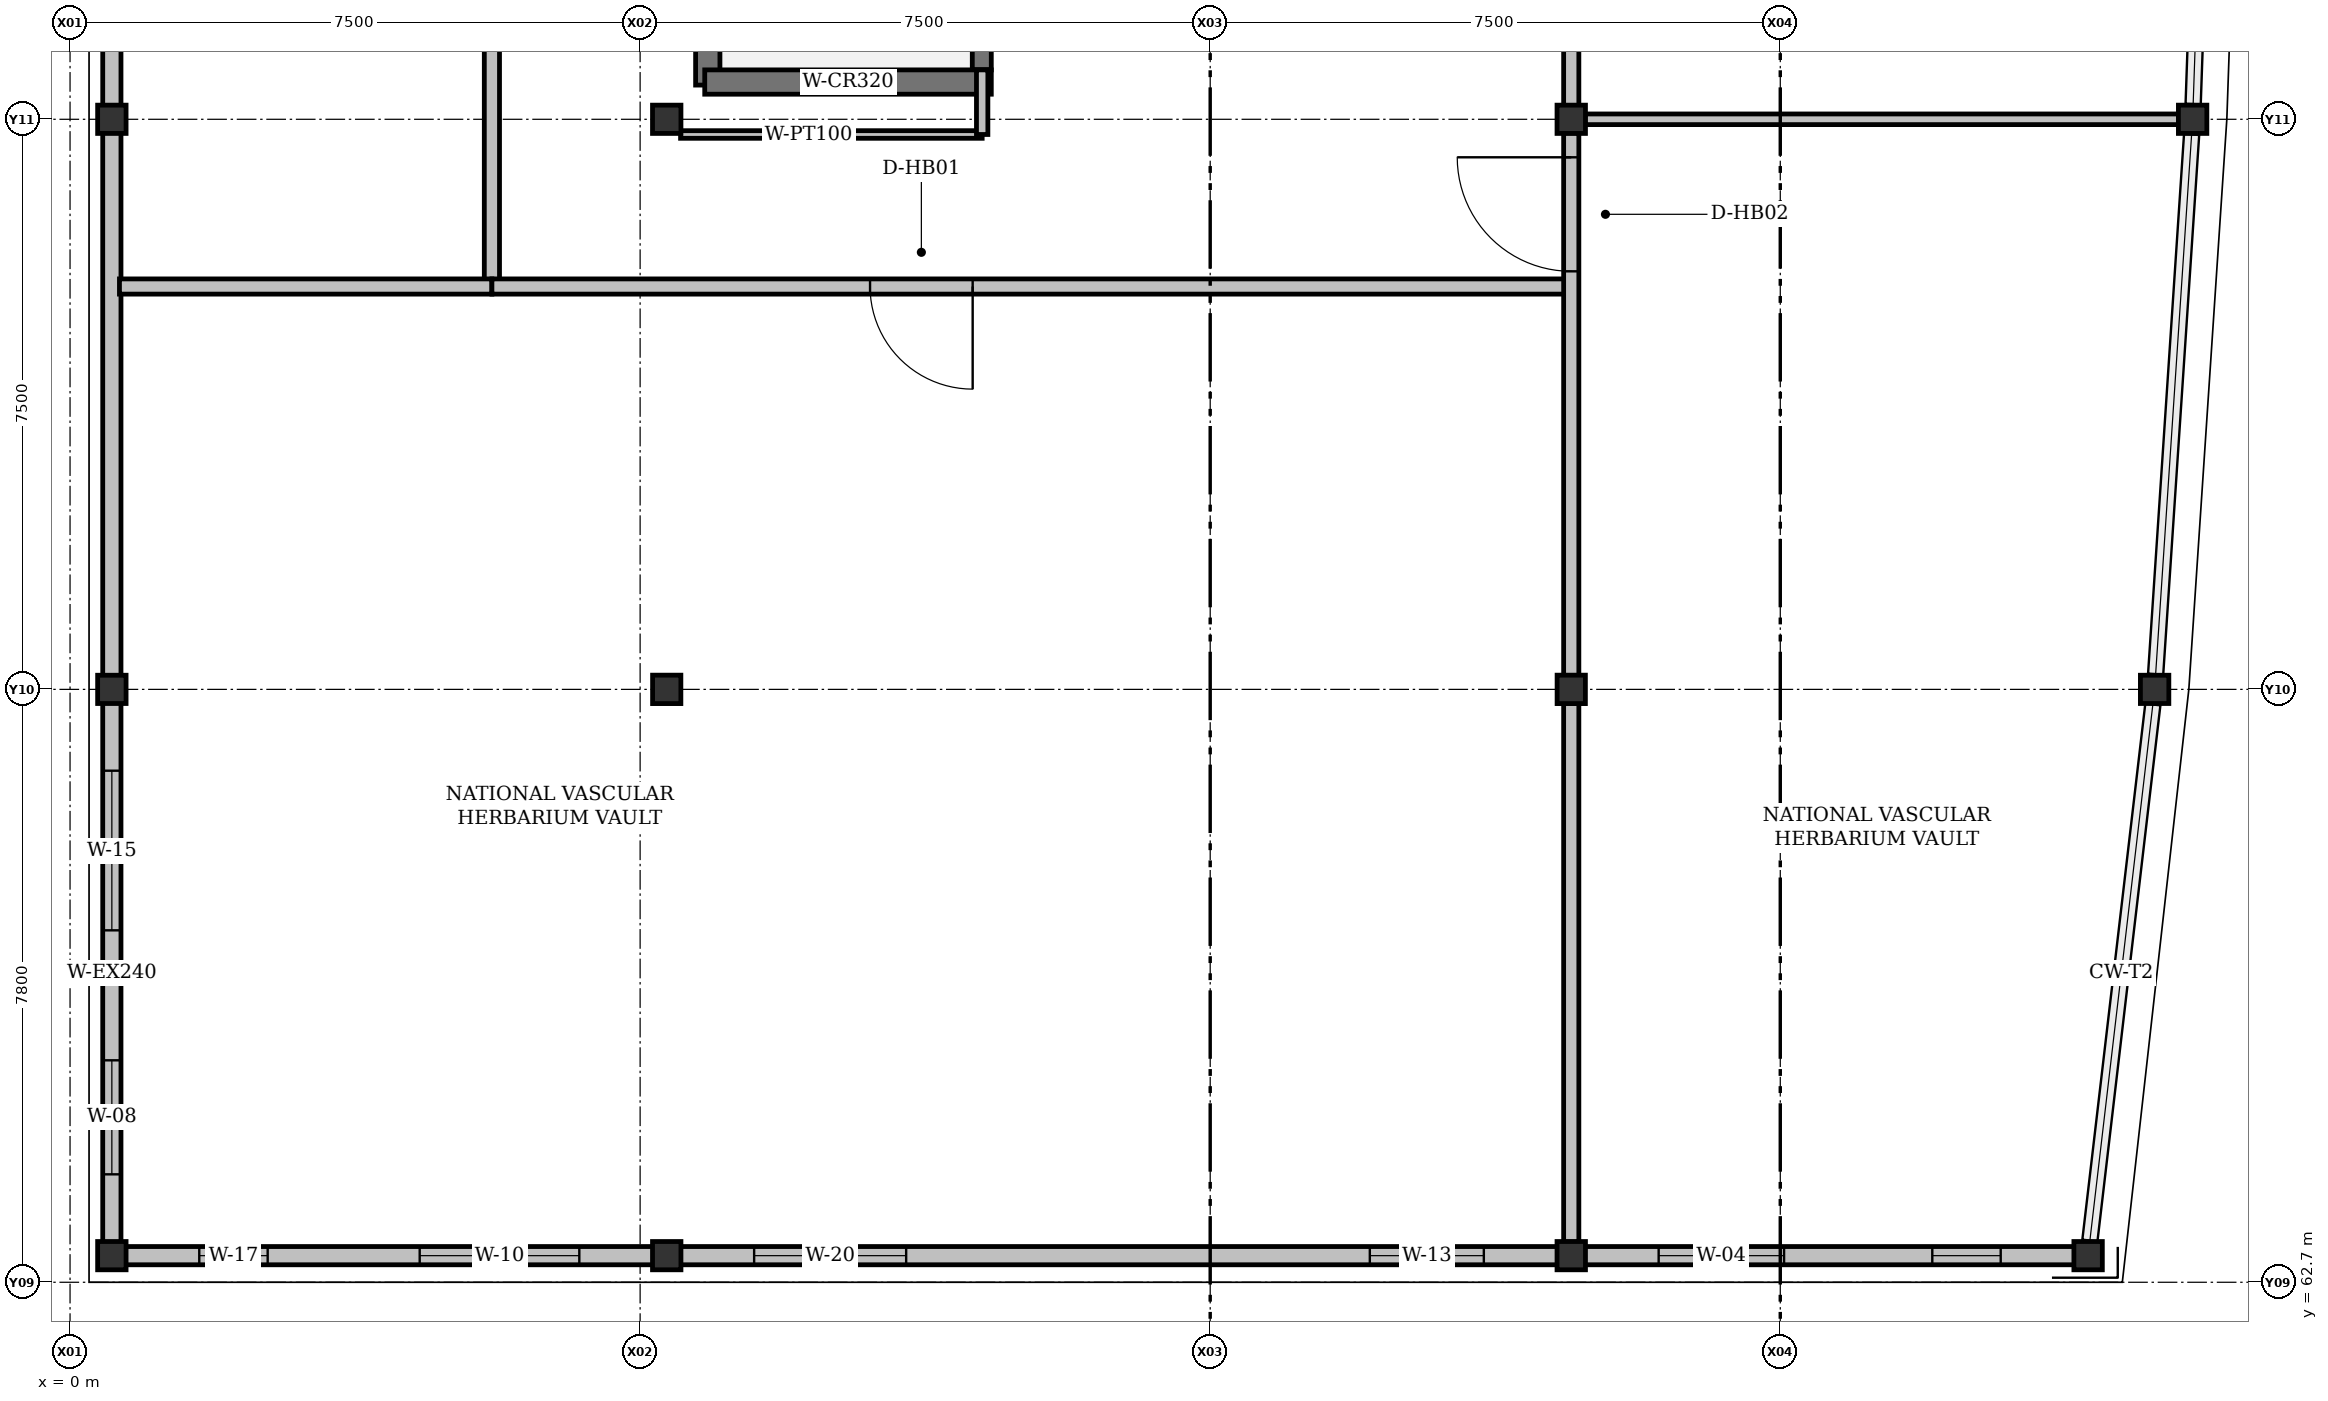
"""IFC4 building model, lengths in metres.
Left out: names, types, materials, properties, quantities, classifications, styles, units other than length and angle.
Written with IfcOpenShell. Run it as: python <this file> out.ifc"""

import sys

from ifc_helpers import new_model, si_unit, direction, frame, frame_2d, origin, origin_2d, place, context, subcontext, project, spatial, rectangle, i_section, extrude, element, fill, save


model = new_model("IFC4")
c1 = context("Model", 3, precision=1e-05, world=origin(), true_north=direction((0.0, 1.0)))
c2 = subcontext(c1, "Body", "Model", "MODEL_VIEW")
j1 = project(units=[si_unit("LENGTHUNIT", "METRE"), si_unit("PLANEANGLEUNIT", "RADIAN")], contexts=[c1])
p1 = place(None, origin())
s1 = spatial("IfcSite", under=j1, at=p1, CompositionType="ELEMENT")
p2 = place(p1, origin())
s2 = spatial("IfcBuilding", under=s1, at=p2, CompositionType="ELEMENT")
p3 = place(p2, frame((0.0, 0.0, 30.9)))
s3 = spatial("IfcBuildingStorey", under=s2, at=p3, CompositionType="ELEMENT", Elevation=30.9)
for number, where, z_axis, x_axis in (
    (1, (0.55, 63.05, 0.0), (0.0, 0.0, 1.0), (1.0, 0.0, 0.0)),
    (2, (7.85, 63.05, 0.0), (0.0, 0.0, 1.0), (1.0, 0.0, 0.0)),
    (3, (19.75, 63.05, 0.0), (0.0, 0.0, 1.0), (1.0, 0.0, 0.0)),
    (4, (26.55, 63.05, 0.0), (0.0, 0.0, 1.0), (1.0, 0.0, 0.0)),
    (5, (0.55, 70.5, 0.0), (0.0, 0.0, 1.0), (1.0, 0.0, 0.0)),
    (6, (7.85, 70.5, 0.0), (0.0, 0.0, 1.0), (0.0, 1.0, 0.0)),
    (7, (19.75, 70.5, 0.0), (0.0, 0.0, 1.0), (0.0, 1.0, 0.0)),
    (8, (27.425, 70.5, 0.0), (0.0, 0.0, 1.0), (1.0, 0.0, 0.0)),
    (9, (0.55, 78.0, 0.0), (0.0, 0.0, 1.0), (1.0, 0.0, 0.0)),
    (10, (7.85, 78.0, 0.0), (0.0, 0.0, 1.0), (1.0, 0.0, 0.0)),
    (11, (19.75, 78.0, 0.0), (0.0, 0.0, 1.0), (1.0, 0.0, 0.0)),
    (12, (27.925, 78.0, 0.0), (0.0, 0.0, 1.0), (1.0, 0.0, 0.0)),
):
    element("IfcColumn", number, at=place(p3, frame(where, z_axis=z_axis, x_axis=x_axis)), inside=s3, PredefinedType="COLUMN", context=c2, shape_type="SweptSolid", body=[
        extrude(i_section(OverallWidth=0.374, OverallDepth=0.372, WebThickness=0.016, FlangeThickness=0.026, FilletRadius=0.015, at=origin_2d()), origin(), (0.0, 0.0, 1.0), 4.2),
    ])
p4 = place(p3, frame((0.55, 63.05, 0.0), z_axis=(0.0, 0.0, 1.0), x_axis=(0.0, 1.0, 0.0)))
e13 = element("IfcWall", 13, at=p4, inside=s3, PredefinedType="SOLIDWALL", context=c2, shape_type="SweptSolid", body=[
    extrude(rectangle(XDim=7.45, YDim=0.24, at=frame_2d((3.725, 0.0))), origin(), (0.0, 0.0, 1.0), 3.562),
])
p5 = place(p4, frame((1.07, 0.0, 0.92)))
e14 = element("IfcOpeningElement", 14, at=p5, cuts=e13, PredefinedType="OPENING", context=c2, shape_type="SweptSolid", body=[
    extrude(rectangle(XDim=1.5, YDim=1.55, at=frame_2d((0.75, 0.775))), frame((0.0, 0.12, 0.0), z_axis=(0.0, -1.0, 0.0), x_axis=(1.0, 0.0, 0.0)), (0.0, 0.0, 1.0), 0.24),
])
p6 = place(p4, frame((4.28, 0.0, 0.92)))
e15 = element("IfcOpeningElement", 15, at=p6, cuts=e13, PredefinedType="OPENING", context=c2, shape_type="SweptSolid", body=[
    extrude(rectangle(XDim=2.1, YDim=1.7, at=frame_2d((1.05, 0.85))), frame((0.0, 0.12, 0.0), z_axis=(0.0, -1.0, 0.0), x_axis=(1.0, 0.0, 0.0)), (0.0, 0.0, 1.0), 0.24),
])
p7 = place(p3, frame((0.55, 70.5, 0.0), z_axis=(0.0, 0.0, 1.0), x_axis=(0.0, 1.0, 0.0)))
e16 = element("IfcWall", 16, at=p7, inside=s3, PredefinedType="SOLIDWALL", context=c2, shape_type="SweptSolid", body=[
    extrude(rectangle(XDim=7.5, YDim=0.24, at=frame_2d((3.75, 0.0))), origin(), (0.0, 0.0, 1.0), 3.562),
])
p8 = place(p3, frame((0.55, 78.0, 0.0), z_axis=(0.0, 0.0, 1.0), x_axis=(0.0, 1.0, 0.0)))
e17 = element("IfcWall", 17, at=p8, inside=s3, PredefinedType="SOLIDWALL", context=c2, shape_type="SweptSolid", body=[
    extrude(rectangle(XDim=7.2, YDim=0.24, at=frame_2d((3.6, 0.0))), origin(), (0.0, 0.0, 1.0), 3.562),
])
p9 = place(p3, frame((7.85, 63.05, 0.0), z_axis=(0.0, 0.0, 1.0), x_axis=(-1.0, 0.0, 0.0)))
e18 = element("IfcWall", 18, at=p9, inside=s3, PredefinedType="SOLIDWALL", context=c2, shape_type="SweptSolid", body=[
    extrude(rectangle(XDim=7.3, YDim=0.24, at=frame_2d((3.65, 0.0))), origin(), (0.0, 0.0, 1.0), 3.562),
])
p10 = place(p9, frame((1.15, 0.0, 0.92)))
e19 = element("IfcOpeningElement", 19, at=p10, cuts=e18, PredefinedType="OPENING", context=c2, shape_type="SweptSolid", body=[
    extrude(rectangle(XDim=2.1, YDim=1.55, at=frame_2d((1.05, 0.775))), frame((0.0, 0.12, 0.0), z_axis=(0.0, -1.0, 0.0), x_axis=(1.0, 0.0, 0.0)), (0.0, 0.0, 1.0), 0.24),
])
p11 = place(p9, frame((5.25, 0.0, 0.92)))
e20 = element("IfcOpeningElement", 20, at=p11, cuts=e18, PredefinedType="OPENING", context=c2, shape_type="SweptSolid", body=[
    extrude(rectangle(XDim=0.9, YDim=1.3, at=frame_2d((0.45, 0.65))), frame((0.0, 0.12, 0.0), z_axis=(0.0, -1.0, 0.0), x_axis=(1.0, 0.0, 0.0)), (0.0, 0.0, 1.0), 0.24),
])
p12 = place(p3, frame((19.75, 63.05, 0.0), z_axis=(0.0, 0.0, 1.0), x_axis=(-1.0, 0.0, 0.0)))
e21 = element("IfcWall", 21, at=p12, inside=s3, PredefinedType="SOLIDWALL", context=c2, shape_type="SweptSolid", body=[
    extrude(rectangle(XDim=11.9, YDim=0.24, at=frame_2d((5.95, 0.0))), origin(), (0.0, 0.0, 1.0), 3.562),
])
p13 = place(p12, frame((1.15, 0.0, 0.92)))
e22 = element("IfcOpeningElement", 22, at=p13, cuts=e21, PredefinedType="OPENING", context=c2, shape_type="SweptSolid", body=[
    extrude(rectangle(XDim=1.5, YDim=1.7, at=frame_2d((0.75, 0.85))), frame((0.0, 0.12, 0.0), z_axis=(0.0, -1.0, 0.0), x_axis=(1.0, 0.0, 0.0)), (0.0, 0.0, 1.0), 0.24),
])
p14 = place(p12, frame((8.75, 0.0, 0.92)))
e23 = element("IfcOpeningElement", 23, at=p14, cuts=e21, PredefinedType="OPENING", context=c2, shape_type="SweptSolid", body=[
    extrude(rectangle(XDim=2.0, YDim=1.35, at=frame_2d((1.0, 0.675))), frame((0.0, 0.12, 0.0), z_axis=(0.0, -1.0, 0.0), x_axis=(1.0, 0.0, 0.0)), (0.0, 0.0, 1.0), 0.24),
])
p15 = place(p3, frame((26.55, 63.05, 0.0), z_axis=(0.0, 0.0, 1.0), x_axis=(-1.0, 0.0, 0.0)))
e24 = element("IfcWall", 24, at=p15, inside=s3, PredefinedType="SOLIDWALL", context=c2, shape_type="SweptSolid", body=[
    extrude(rectangle(XDim=6.8, YDim=0.24, at=frame_2d((3.4, 0.0))), origin(), (0.0, 0.0, 1.0), 2.775),
])
p16 = place(p15, frame((1.15, 0.0, 0.92)))
e25 = element("IfcOpeningElement", 25, at=p16, cuts=e24, PredefinedType="OPENING", context=c2, shape_type="SweptSolid", body=[
    extrude(rectangle(XDim=0.9, YDim=1.3, at=frame_2d((0.45, 0.65))), frame((0.0, 0.12, 0.0), z_axis=(0.0, -1.0, 0.0), x_axis=(1.0, 0.0, 0.0)), (0.0, 0.0, 1.0), 0.24),
])
p17 = place(p15, frame((4.0, 0.0, 0.92)))
e26 = element("IfcOpeningElement", 26, at=p17, cuts=e24, PredefinedType="OPENING", context=c2, shape_type="SweptSolid", body=[
    extrude(rectangle(XDim=1.65, YDim=1.4, at=frame_2d((0.825, 0.7))), frame((0.0, 0.12, 0.0), z_axis=(0.0, -1.0, 0.0), x_axis=(1.0, 0.0, 0.0)), (0.0, 0.0, 1.0), 0.24),
])
p18 = place(p3, frame((8.39, 78.45, 0.0), z_axis=(0.0, 0.0, 1.0), x_axis=(0.0, 1.0, 0.0)))
e27 = element("IfcWall", 27, at=p18, inside=s3, PredefinedType="SHEAR", context=c2, shape_type="SweptSolid", body=[
    extrude(rectangle(XDim=8.175, YDim=0.32, at=frame_2d((4.087, 0.0))), origin(), (0.0, 0.0, 1.0), 4.2),
])
p19 = place(p3, frame((11.995, 78.65, 0.0), z_axis=(0.0, 0.0, 1.0), x_axis=(0.0, 1.0, 0.0)))
e28 = element("IfcWall", 28, at=p19, inside=s3, PredefinedType="SHEAR", context=c2, shape_type="SweptSolid", body=[
    extrude(rectangle(XDim=7.85, YDim=0.25, at=frame_2d((3.925, 0.0))), origin(), (0.0, 0.0, 1.0), 4.2),
])
p20 = place(p3, frame((8.35, 78.49, 0.0), z_axis=(0.0, 0.0, 1.0), x_axis=(1.0, 0.0, 0.0)))
e29 = element("IfcWall", 29, at=p20, inside=s3, PredefinedType="SHEAR", context=c2, shape_type="SweptSolid", body=[
    extrude(rectangle(XDim=3.77, YDim=0.32, at=frame_2d((1.885, 0.0))), origin(), (0.0, 0.0, 1.0), 4.2),
])
p21 = place(p3, frame((8.032, 77.8, 0.0), z_axis=(0.0, 0.0, 1.0), x_axis=(1.0, 0.0, 0.0)))
e30 = element("IfcWall", 30, at=p21, inside=s3, PredefinedType="PARTITIONING", context=c2, shape_type="SweptSolid", body=[
    extrude(rectangle(XDim=3.968, YDim=0.1, at=frame_2d((1.984, 0.0))), origin(), (0.0, 0.0, 1.0), 3.436),
])
p22 = place(p3, frame((12.0, 77.8, 0.0), z_axis=(0.0, 0.0, 1.0), x_axis=(0.0, 1.0, 0.0)))
e31 = element("IfcWall", 31, at=p22, inside=s3, PredefinedType="PARTITIONING", context=c2, shape_type="SweptSolid", body=[
    extrude(rectangle(XDim=0.85, YDim=0.15, at=frame_2d((0.425, 0.0))), origin(), (0.0, 0.0, 1.0), 3.436),
])
p23 = place(p3, frame((5.55, 75.8, 0.0), z_axis=(0.0, 0.0, 1.0), x_axis=(0.0, 1.0, 0.0)))
e32 = element("IfcWall", 32, at=p23, inside=s3, PredefinedType="SOLIDWALL", context=c2, shape_type="SweptSolid", body=[
    extrude(rectangle(XDim=16.6, YDim=0.2, at=frame_2d((8.3, 0.0))), origin(), (0.0, 0.0, 1.0), 3.436),
])
p24 = place(p23, frame((7.55, 0.0, 0.0)))
e33 = element("IfcOpeningElement", 33, at=p24, cuts=e32, PredefinedType="OPENING", context=c2, shape_type="SweptSolid", body=[
    extrude(rectangle(XDim=1.5, YDim=2.3, at=frame_2d((0.75, 1.15))), frame((0.0, 0.1, 0.0), z_axis=(0.0, -1.0, 0.0), x_axis=(1.0, 0.0, 0.0)), (0.0, 0.0, 1.0), 0.2),
])
p25 = place(p3, frame((19.75, 78.181, 0.0), z_axis=(0.0, 0.0, 1.0), x_axis=(0.0, 1.0, 0.0)))
e34 = element("IfcWall", 34, at=p25, inside=s3, PredefinedType="SOLIDWALL", context=c2, shape_type="SweptSolid", body=[
    extrude(rectangle(XDim=6.837, YDim=0.2, at=frame_2d((3.418, 0.0))), origin(), (0.0, 0.0, 1.0), 3.512),
])
p26 = place(p3, frame((27.743, 78.0, 0.0), z_axis=(0.0, 0.0, 1.0), x_axis=(-1.0, 0.0, 0.0)))
e35 = element("IfcWall", 35, at=p26, inside=s3, PredefinedType="PARTITIONING", context=c2, shape_type="SweptSolid", body=[
    extrude(rectangle(XDim=7.811, YDim=0.14, at=frame_2d((3.906, 0.0))), origin(), (0.0, 0.0, 1.0), 2.775),
])
p27 = place(p3, frame((0.65, 75.8, 0.0), z_axis=(0.0, 0.0, 1.0), x_axis=(1.0, 0.0, 0.0)))
e36 = element("IfcWall", 36, at=p27, inside=s3, PredefinedType="SOLIDWALL", context=c2, shape_type="SweptSolid", body=[
    extrude(rectangle(XDim=4.9, YDim=0.2, at=frame_2d((2.45, 0.0))), origin(), (0.0, 0.0, 1.0), 3.95),
])
p28 = place(p3, frame((19.75, 75.8, 0.0), z_axis=(0.0, 0.0, 1.0), x_axis=(-1.0, 0.0, 0.0)))
e37 = element("IfcWall", 37, at=p28, inside=s3, PredefinedType="SOLIDWALL", context=c2, shape_type="SweptSolid", body=[
    extrude(rectangle(XDim=14.2, YDim=0.2, at=frame_2d((7.1, 0.0))), origin(), (0.0, 0.0, 1.0), 3.512),
])
p29 = place(p28, frame((7.875, 0.0, 0.0)))
e38 = element("IfcOpeningElement", 38, at=p29, cuts=e37, PredefinedType="OPENING", context=c2, shape_type="SweptSolid", body=[
    extrude(rectangle(XDim=1.35, YDim=2.25, at=frame_2d((0.675, 1.125))), frame((0.0, 0.1, 0.0), z_axis=(0.0, -1.0, 0.0), x_axis=(1.0, 0.0, 0.0)), (0.0, 0.0, 1.0), 0.2),
])
p30 = place(p3, frame((19.75, 63.231, 0.0), z_axis=(0.0, 0.0, 1.0), x_axis=(0.0, 1.0, 0.0)))
e39 = element("IfcWall", 39, at=p30, inside=s3, PredefinedType="SOLIDWALL", context=c2, shape_type="SweptSolid", body=[
    extrude(rectangle(XDim=7.087, YDim=0.2, at=frame_2d((3.543, 0.0))), origin(), (0.0, 0.0, 1.0), 3.512),
])
p31 = place(p3, frame((19.75, 70.682, 0.0), z_axis=(0.0, 0.0, 1.0), x_axis=(0.0, 1.0, 0.0)))
e40 = element("IfcWall", 40, at=p31, inside=s3, PredefinedType="SOLIDWALL", context=c2, shape_type="SweptSolid", body=[
    extrude(rectangle(XDim=7.137, YDim=0.2, at=frame_2d((3.569, 0.0))), origin(), (0.0, 0.0, 1.0), 3.512),
])
p32 = place(p31, frame((5.318, 0.0, 0.0)))
e41 = element("IfcOpeningElement", 41, at=p32, cuts=e40, PredefinedType="OPENING", context=c2, shape_type="SweptSolid", body=[
    extrude(rectangle(XDim=1.5, YDim=2.3, at=frame_2d((0.75, 1.15))), frame((0.0, 0.1, 0.0), z_axis=(0.0, -1.0, 0.0), x_axis=(1.0, 0.0, 0.0)), (0.0, 0.0, 1.0), 0.2),
])
p33 = place(p5, origin())
e42 = element("IfcWindow", 42, at=p33, inside=s3, PartitioningType="SINGLE_PANEL", PredefinedType="WINDOW", context=c2, shape_type="SweptSolid", body=[
    extrude(rectangle(XDim=1.5, YDim=1.55, at=frame_2d((0.75, 0.775))), frame((0.0, 0.03, 0.0), z_axis=(0.0, -1.0, 0.0), x_axis=(1.0, 0.0, 0.0)), (0.0, 0.0, 1.0), 0.06),
])
fill(e14, e42)
p34 = place(p6, origin())
e43 = element("IfcWindow", 43, at=p34, inside=s3, PartitioningType="DOUBLE_PANEL_VERTICAL", PredefinedType="WINDOW", context=c2, shape_type="SweptSolid", body=[
    extrude(rectangle(XDim=2.1, YDim=1.7, at=frame_2d((1.05, 0.85))), frame((0.0, 0.03, 0.0), z_axis=(0.0, -1.0, 0.0), x_axis=(1.0, 0.0, 0.0)), (0.0, 0.0, 1.0), 0.06),
])
fill(e15, e43)
p35 = place(p10, origin())
e44 = element("IfcWindow", 44, at=p35, inside=s3, PartitioningType="DOUBLE_PANEL_VERTICAL", PredefinedType="WINDOW", context=c2, shape_type="SweptSolid", body=[
    extrude(rectangle(XDim=2.1, YDim=1.55, at=frame_2d((1.05, 0.775))), frame((0.0, 0.03, 0.0), z_axis=(0.0, -1.0, 0.0), x_axis=(1.0, 0.0, 0.0)), (0.0, 0.0, 1.0), 0.06),
])
fill(e19, e44)
p36 = place(p11, origin())
e45 = element("IfcWindow", 45, at=p36, inside=s3, PartitioningType="SINGLE_PANEL", PredefinedType="WINDOW", context=c2, shape_type="SweptSolid", body=[
    extrude(rectangle(XDim=0.9, YDim=1.3, at=frame_2d((0.45, 0.65))), frame((0.0, 0.03, 0.0), z_axis=(0.0, -1.0, 0.0), x_axis=(1.0, 0.0, 0.0)), (0.0, 0.0, 1.0), 0.06),
])
fill(e20, e45)
p37 = place(p13, origin())
e46 = element("IfcWindow", 46, at=p37, inside=s3, PartitioningType="SINGLE_PANEL", PredefinedType="WINDOW", context=c2, shape_type="SweptSolid", body=[
    extrude(rectangle(XDim=1.5, YDim=1.7, at=frame_2d((0.75, 0.85))), frame((0.0, 0.03, 0.0), z_axis=(0.0, -1.0, 0.0), x_axis=(1.0, 0.0, 0.0)), (0.0, 0.0, 1.0), 0.06),
])
fill(e22, e46)
p38 = place(p14, origin())
e47 = element("IfcWindow", 47, at=p38, inside=s3, PartitioningType="DOUBLE_PANEL_VERTICAL", PredefinedType="WINDOW", context=c2, shape_type="SweptSolid", body=[
    extrude(rectangle(XDim=2.0, YDim=1.35, at=frame_2d((1.0, 0.675))), frame((0.0, 0.03, 0.0), z_axis=(0.0, -1.0, 0.0), x_axis=(1.0, 0.0, 0.0)), (0.0, 0.0, 1.0), 0.06),
])
fill(e23, e47)
p39 = place(p16, origin())
e48 = element("IfcWindow", 48, at=p39, inside=s3, PartitioningType="SINGLE_PANEL", PredefinedType="WINDOW", context=c2, shape_type="SweptSolid", body=[
    extrude(rectangle(XDim=0.9, YDim=1.3, at=frame_2d((0.45, 0.65))), frame((0.0, 0.03, 0.0), z_axis=(0.0, -1.0, 0.0), x_axis=(1.0, 0.0, 0.0)), (0.0, 0.0, 1.0), 0.06),
])
fill(e25, e48)
p40 = place(p17, origin())
e49 = element("IfcWindow", 49, at=p40, inside=s3, PartitioningType="DOUBLE_PANEL_VERTICAL", PredefinedType="WINDOW", context=c2, shape_type="SweptSolid", body=[
    extrude(rectangle(XDim=1.65, YDim=1.4, at=frame_2d((0.825, 0.7))), frame((0.0, 0.03, 0.0), z_axis=(0.0, -1.0, 0.0), x_axis=(1.0, 0.0, 0.0)), (0.0, 0.0, 1.0), 0.06),
])
fill(e26, e49)
p41 = place(p29, origin())
e50 = element("IfcDoor", 50, at=p41, inside=s3, OperationType="SINGLE_SWING_LEFT", PredefinedType="DOOR", context=c2, shape_type="SweptSolid", body=[
    extrude(rectangle(XDim=1.35, YDim=2.25, at=frame_2d((0.675, 1.125))), frame((0.0, 0.025, 0.0), z_axis=(0.0, -1.0, 0.0), x_axis=(1.0, 0.0, 0.0)), (0.0, 0.0, 1.0), 0.05),
])
fill(e38, e50)
p42 = place(p32, origin())
e51 = element("IfcDoor", 51, at=p42, inside=s3, OperationType="SINGLE_SWING_RIGHT", PredefinedType="DOOR", context=c2, shape_type="SweptSolid", body=[
    extrude(rectangle(XDim=1.5, YDim=2.3, at=frame_2d((0.75, 1.15))), frame((0.0, 0.025, 0.0), z_axis=(0.0, -1.0, 0.0), x_axis=(1.0, 0.0, 0.0)), (0.0, 0.0, 1.0), 0.05),
])
fill(e41, e51)
save(model, sys.argv[1])
